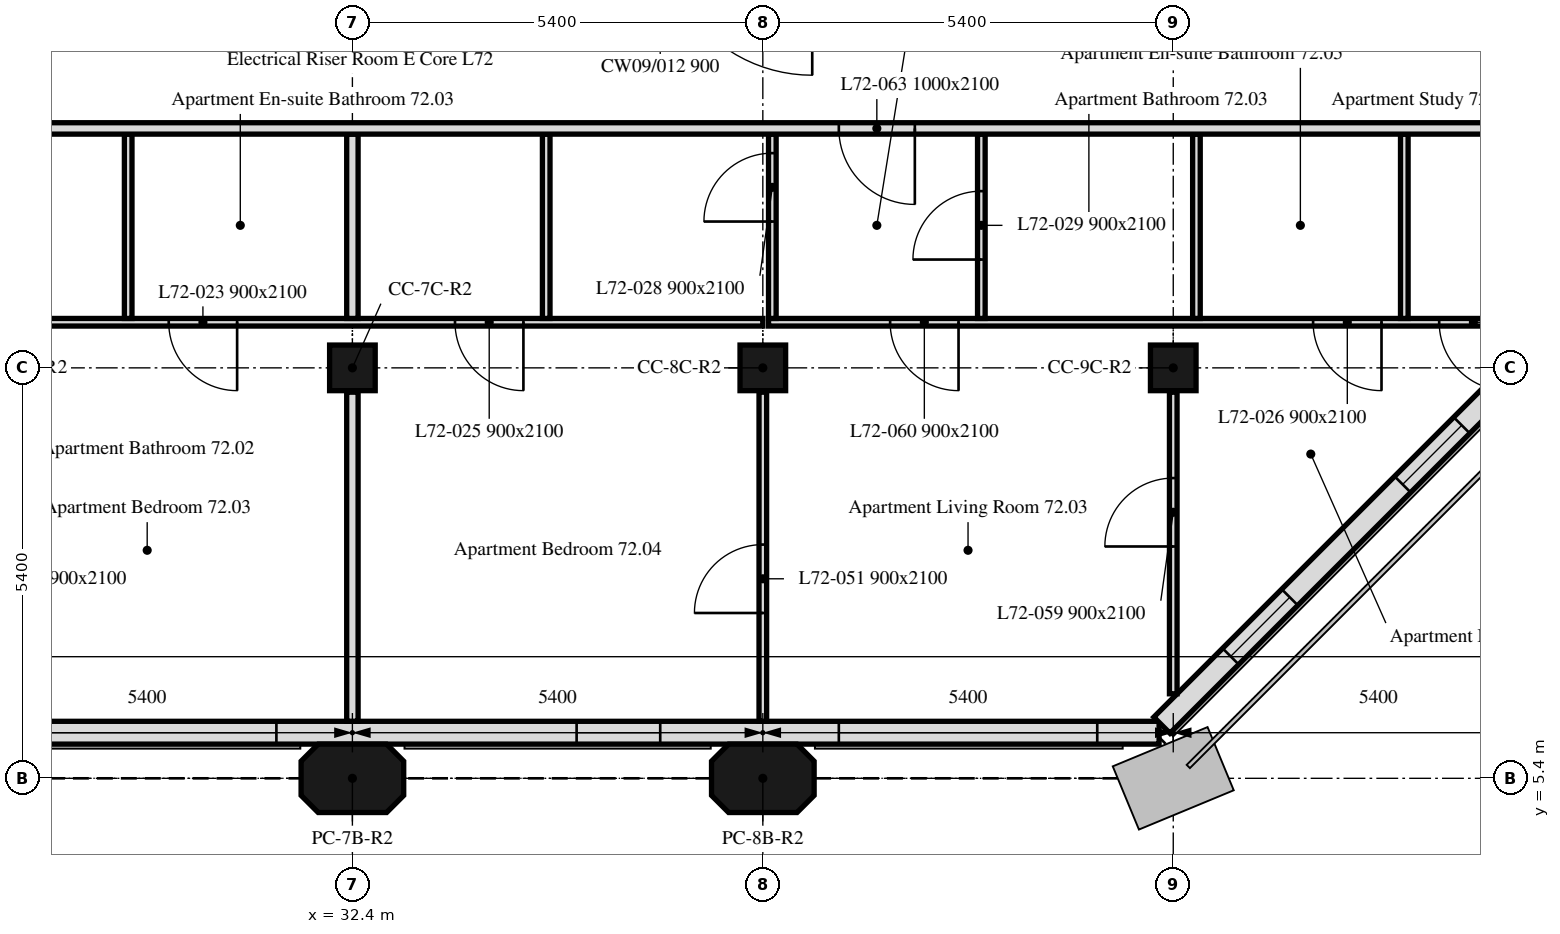
"""IFC4 building model, lengths in metres.
Left out: names, types, materials, properties, quantities, classifications, styles, units other than length and angle.
Written with IfcOpenShell. Run it as: python <this file> out.ifc"""

import sys

from ifc_helpers import new_model, si_unit, direction, frame, frame_2d, origin, origin_2d, place, context, subcontext, project, spatial, polyline, rectangle, outline, extrude, element, fill, save


model = new_model("IFC4")
c1 = context("Model", 3, precision=1e-05, world=origin(), true_north=direction((0.0, 1.0)))
c2 = subcontext(c1, "Body", "Model", "MODEL_VIEW")
j1 = project(units=[si_unit("LENGTHUNIT", "METRE"), si_unit("PLANEANGLEUNIT", "RADIAN")], contexts=[c1])
p1 = place(None, origin())
s1 = spatial("IfcSite", under=j1, at=p1, CompositionType="ELEMENT")
p2 = place(p1, origin())
s2 = spatial("IfcBuilding", under=s1, at=p2, CompositionType="ELEMENT")
p3 = place(p2, frame((0.0, 0.0, 291.7)))
s3 = spatial("IfcBuildingStorey", under=s2, at=p3, CompositionType="ELEMENT", Elevation=291.7)
for number, where, z_axis, x_axis in (
    (1, (32.4, 5.4, 0.0), (0.0, 0.0, 1.0), (1.0, 0.0, 0.0)),
    (2, (37.8, 5.4, 0.0), (0.0, 0.0, 1.0), (1.0, 0.0, 0.0)),
):
    element("IfcColumn", number, at=place(p3, frame(where, z_axis=z_axis, x_axis=x_axis)), inside=s3, PredefinedType="COLUMN", context=c2, shape_type="SweptSolid", body=[
        extrude(outline(polyline([(-0.45, -0.45), (0.45, -0.45), (0.675, -0.225), (0.675, 0.225), (0.45, 0.45), (-0.45, 0.45), (-0.675, 0.225), (-0.675, -0.225), (-0.45, -0.45)])), origin(), (0.0, 0.0, 1.0), 3.0),
    ])
for number, where, z_axis, x_axis in (
    (3, (32.4, 10.8, 0.0), (0.0, 0.0, 1.0), (1.0, 0.0, 0.0)),
    (4, (37.8, 10.8, 0.0), (0.0, 0.0, 1.0), (1.0, 0.0, 0.0)),
    (5, (43.2, 10.8, 0.0), (0.0, 0.0, 1.0), (1.0, 0.0, 0.0)),
):
    element("IfcColumn", number, at=place(p3, frame(where, z_axis=z_axis, x_axis=x_axis)), inside=s3, PredefinedType="COLUMN", context=c2, shape_type="SweptSolid", body=[
        extrude(rectangle(XDim=0.6, YDim=0.6, at=origin_2d()), origin(), (0.0, 0.0, 1.0), 3.0),
    ])
p4 = place(p3, frame((10.986, 6.0, 0.0), z_axis=(0.0, 0.0, 1.0), x_axis=(1.0, 0.0, 0.0)))
e6 = element("IfcWall", 6, at=p4, inside=s3, PredefinedType="SOLIDWALL", context=c2, shape_type="SweptSolid", body=[
    extrude(rectangle(XDim=32.027, YDim=0.3, at=frame_2d((16.014, 0.0))), origin(), (0.0, 0.0, 1.0), 3.0),
])
p5 = place(p4, frame((2.764, 0.0, 0.9)))
e7 = element("IfcOpeningElement", 7, at=p5, cuts=e6, PredefinedType="OPENING", context=c2, shape_type="SweptSolid", body=[
    extrude(rectangle(XDim=1.1, YDim=1.7, at=frame_2d((0.55, 0.85))), frame((0.0, 0.16, 0.0), z_axis=(0.0, -1.0, 0.0), x_axis=(1.0, 0.0, 0.0)), (0.0, 0.0, 1.0), 0.32),
])
p6 = place(p4, frame((6.214, 0.0, 0.9)))
e8 = element("IfcOpeningElement", 8, at=p6, cuts=e6, PredefinedType="OPENING", context=c2, shape_type="SweptSolid", body=[
    extrude(rectangle(XDim=3.4, YDim=1.7, at=frame_2d((1.7, 0.85))), frame((0.0, 0.16, 0.0), z_axis=(0.0, -1.0, 0.0), x_axis=(1.0, 0.0, 0.0)), (0.0, 0.0, 1.0), 0.32),
])
p7 = place(p4, frame((13.564, 0.0, 0.9)))
e9 = element("IfcOpeningElement", 9, at=p7, cuts=e6, PredefinedType="OPENING", context=c2, shape_type="SweptSolid", body=[
    extrude(rectangle(XDim=1.1, YDim=1.7, at=frame_2d((0.55, 0.85))), frame((0.0, 0.16, 0.0), z_axis=(0.0, -1.0, 0.0), x_axis=(1.0, 0.0, 0.0)), (0.0, 0.0, 1.0), 0.32),
])
p8 = place(p4, frame((17.014, 0.0, 0.9)))
e10 = element("IfcOpeningElement", 10, at=p8, cuts=e6, PredefinedType="OPENING", context=c2, shape_type="SweptSolid", body=[
    extrude(rectangle(XDim=3.4, YDim=1.7, at=frame_2d((1.7, 0.85))), frame((0.0, 0.16, 0.0), z_axis=(0.0, -1.0, 0.0), x_axis=(1.0, 0.0, 0.0)), (0.0, 0.0, 1.0), 0.32),
])
p9 = place(p4, frame((24.364, 0.0, 0.9)))
e11 = element("IfcOpeningElement", 11, at=p9, cuts=e6, PredefinedType="OPENING", context=c2, shape_type="SweptSolid", body=[
    extrude(rectangle(XDim=1.1, YDim=1.7, at=frame_2d((0.55, 0.85))), frame((0.0, 0.16, 0.0), z_axis=(0.0, -1.0, 0.0), x_axis=(1.0, 0.0, 0.0)), (0.0, 0.0, 1.0), 0.32),
])
p10 = place(p4, frame((27.814, 0.0, 0.9)))
e12 = element("IfcOpeningElement", 12, at=p10, cuts=e6, PredefinedType="OPENING", context=c2, shape_type="SweptSolid", body=[
    extrude(rectangle(XDim=3.4, YDim=1.7, at=frame_2d((1.7, 0.85))), frame((0.0, 0.16, 0.0), z_axis=(0.0, -1.0, 0.0), x_axis=(1.0, 0.0, 0.0)), (0.0, 0.0, 1.0), 0.32),
])
p11 = place(p3, frame((43.051, 6.099, 0.0), z_axis=(0.0, 0.0, 1.0), x_axis=(0.707106781187, 0.707106781187, 0.0)))
e13 = element("IfcWall", 13, at=p11, inside=s3, PredefinedType="SOLIDWALL", context=c2, shape_type="SweptSolid", body=[
    extrude(rectangle(XDim=6.86, YDim=0.3, at=frame_2d((3.43, 0.0))), origin(), (0.0, 0.0, 1.0), 3.0),
])
p12 = place(p11, frame((1.28, 0.0, 0.9)))
e14 = element("IfcOpeningElement", 14, at=p12, cuts=e13, PredefinedType="OPENING", context=c2, shape_type="SweptSolid", body=[
    extrude(rectangle(XDim=1.1, YDim=1.7, at=frame_2d((0.55, 0.85))), frame((0.0, 0.16, 0.0), z_axis=(0.0, -1.0, 0.0), x_axis=(1.0, 0.0, 0.0)), (0.0, 0.0, 1.0), 0.32),
])
p13 = place(p11, frame((4.48, 0.0, 0.9)))
e15 = element("IfcOpeningElement", 15, at=p13, cuts=e13, PredefinedType="OPENING", context=c2, shape_type="SweptSolid", body=[
    extrude(rectangle(XDim=1.1, YDim=1.7, at=frame_2d((0.55, 0.85))), frame((0.0, 0.16, 0.0), z_axis=(0.0, -1.0, 0.0), x_axis=(1.0, 0.0, 0.0)), (0.0, 0.0, 1.0), 0.32),
])
p14 = place(p3, frame((37.8, 11.4, 0.0), z_axis=(0.0, 0.0, 1.0), x_axis=(-1.0, 0.0, 0.0)))
e16 = element("IfcWall", 16, at=p14, inside=s3, PredefinedType="PARTITIONING", context=c2, shape_type="SweptSolid", body=[
    extrude(rectangle(XDim=21.6, YDim=0.1, at=frame_2d((10.8, 0.0))), origin(), (0.0, 0.0, 1.0), 3.0),
])
p15 = place(p14, frame((18.87, 0.0, 0.0)))
e17 = element("IfcOpeningElement", 17, at=p15, cuts=e16, PredefinedType="OPENING", context=c2, shape_type="SweptSolid", body=[
    extrude(rectangle(XDim=0.9, YDim=2.1, at=frame_2d((0.45, 1.05))), frame((0.0, 0.05, 0.0), z_axis=(0.0, -1.0, 0.0), x_axis=(1.0, 0.0, 0.0)), (0.0, 0.0, 1.0), 0.1),
])
p16 = place(p14, frame((17.5, 0.0, 0.0)))
e18 = element("IfcOpeningElement", 18, at=p16, cuts=e16, PredefinedType="OPENING", context=c2, shape_type="SweptSolid", body=[
    extrude(rectangle(XDim=0.9, YDim=2.1, at=frame_2d((0.45, 1.05))), frame((0.0, 0.05, 0.0), z_axis=(0.0, -1.0, 0.0), x_axis=(1.0, 0.0, 0.0)), (0.0, 0.0, 1.0), 0.1),
])
p17 = place(p14, frame((6.917, 0.0, 0.0)))
e19 = element("IfcOpeningElement", 19, at=p17, cuts=e16, PredefinedType="OPENING", context=c2, shape_type="SweptSolid", body=[
    extrude(rectangle(XDim=0.9, YDim=2.1, at=frame_2d((0.45, 1.05))), frame((0.0, 0.05, 0.0), z_axis=(0.0, -1.0, 0.0), x_axis=(1.0, 0.0, 0.0)), (0.0, 0.0, 1.0), 0.1),
])
p18 = place(p14, frame((3.15, 0.0, 0.0)))
e20 = element("IfcOpeningElement", 20, at=p18, cuts=e16, PredefinedType="OPENING", context=c2, shape_type="SweptSolid", body=[
    extrude(rectangle(XDim=0.9, YDim=2.1, at=frame_2d((0.45, 1.05))), frame((0.0, 0.05, 0.0), z_axis=(0.0, -1.0, 0.0), x_axis=(1.0, 0.0, 0.0)), (0.0, 0.0, 1.0), 0.1),
])
p19 = place(p14, frame((14.158, 0.0, 0.0)))
e21 = element("IfcOpeningElement", 21, at=p19, cuts=e16, PredefinedType="OPENING", context=c2, shape_type="SweptSolid", body=[
    extrude(rectangle(XDim=0.9, YDim=2.1, at=frame_2d((0.45, 1.05))), frame((0.0, 0.05, 0.0), z_axis=(0.0, -1.0, 0.0), x_axis=(1.0, 0.0, 0.0)), (0.0, 0.0, 1.0), 0.1),
])
p20 = place(p14, frame((12.788, 0.0, 0.0)))
e22 = element("IfcOpeningElement", 22, at=p20, cuts=e16, PredefinedType="OPENING", context=c2, shape_type="SweptSolid", body=[
    extrude(rectangle(XDim=0.9, YDim=2.1, at=frame_2d((0.45, 1.05))), frame((0.0, 0.05, 0.0), z_axis=(0.0, -1.0, 0.0), x_axis=(1.0, 0.0, 0.0)), (0.0, 0.0, 1.0), 0.1),
])
p21 = place(p3, frame((32.4, 6.151, 0.0), z_axis=(0.0, 0.0, 1.0), x_axis=(0.0, 1.0, 0.0)))
e23 = element("IfcWall", 23, at=p21, inside=s3, PredefinedType="PARTITIONING", context=c2, shape_type="SweptSolid", body=[
    extrude(rectangle(XDim=4.329, YDim=0.15, at=frame_2d((2.165, 0.0))), origin(), (0.0, 0.0, 1.0), 3.0),
])
p22 = place(p3, frame((29.45, 11.45, 0.0), z_axis=(0.0, 0.0, 1.0), x_axis=(0.0, 1.0, 0.0)))
e24 = element("IfcWall", 24, at=p22, inside=s3, PredefinedType="PARTITIONING", context=c2, shape_type="SweptSolid", body=[
    extrude(rectangle(XDim=2.425, YDim=0.1, at=frame_2d((1.212, 0.0))), origin(), (0.0, 0.0, 1.0), 3.0),
])
p23 = place(p3, frame((32.4, 11.45, 0.0), z_axis=(0.0, 0.0, 1.0), x_axis=(0.0, 1.0, 0.0)))
e25 = element("IfcWall", 25, at=p23, inside=s3, PredefinedType="PARTITIONING", context=c2, shape_type="SweptSolid", body=[
    extrude(rectangle(XDim=2.425, YDim=0.15, at=frame_2d((1.212, 0.0))), origin(), (0.0, 0.0, 1.0), 3.0),
])
p24 = place(p3, frame((37.8, 6.151, 0.0), z_axis=(0.0, 0.0, 1.0), x_axis=(0.0, 1.0, 0.0)))
e26 = element("IfcWall", 26, at=p24, inside=s3, PredefinedType="PARTITIONING", context=c2, shape_type="SweptSolid", body=[
    extrude(rectangle(XDim=4.329, YDim=0.1, at=frame_2d((2.165, 0.0))), origin(), (0.0, 0.0, 1.0), 3.0),
])
p25 = place(p24, frame((1.424, 0.0, 0.0)))
e27 = element("IfcOpeningElement", 27, at=p25, cuts=e26, PredefinedType="OPENING", context=c2, shape_type="SweptSolid", body=[
    extrude(rectangle(XDim=0.9, YDim=2.1, at=frame_2d((0.45, 1.05))), frame((0.0, 0.05, 0.0), z_axis=(0.0, -1.0, 0.0), x_axis=(1.0, 0.0, 0.0)), (0.0, 0.0, 1.0), 0.1),
])
p26 = place(p3, frame((43.2, 6.512, 0.0), z_axis=(0.0, 0.0, 1.0), x_axis=(0.0, 1.0, 0.0)))
e28 = element("IfcWall", 28, at=p26, inside=s3, PredefinedType="PARTITIONING", context=c2, shape_type="SweptSolid", body=[
    extrude(rectangle(XDim=3.968, YDim=0.1, at=frame_2d((1.984, 0.0))), origin(), (0.0, 0.0, 1.0), 3.0),
])
p27 = place(p26, frame((1.938, 0.0, 0.0)))
e29 = element("IfcOpeningElement", 29, at=p27, cuts=e28, PredefinedType="OPENING", context=c2, shape_type="SweptSolid", body=[
    extrude(rectangle(XDim=0.9, YDim=2.1, at=frame_2d((0.45, 1.05))), frame((0.0, 0.05, 0.0), z_axis=(0.0, -1.0, 0.0), x_axis=(1.0, 0.0, 0.0)), (0.0, 0.0, 1.0), 0.1),
])
p28 = place(p3, frame((47.849, 11.4, 0.0), z_axis=(0.0, 0.0, 1.0), x_axis=(-1.0, 0.0, 0.0)))
e30 = element("IfcWall", 30, at=p28, inside=s3, PredefinedType="PARTITIONING", context=c2, shape_type="SweptSolid", body=[
    extrude(rectangle(XDim=9.974, YDim=0.1, at=frame_2d((4.987, 0.0))), origin(), (0.0, 0.0, 1.0), 3.0),
])
p29 = place(p28, frame((1.909, 0.0, 0.0)))
e31 = element("IfcOpeningElement", 31, at=p29, cuts=e30, PredefinedType="OPENING", context=c2, shape_type="SweptSolid", body=[
    extrude(rectangle(XDim=0.9, YDim=2.1, at=frame_2d((0.45, 1.05))), frame((0.0, 0.05, 0.0), z_axis=(0.0, -1.0, 0.0), x_axis=(1.0, 0.0, 0.0)), (0.0, 0.0, 1.0), 0.1),
])
p30 = place(p28, frame((0.25, 0.0, 0.0)))
e32 = element("IfcOpeningElement", 32, at=p30, cuts=e30, PredefinedType="OPENING", context=c2, shape_type="SweptSolid", body=[
    extrude(rectangle(XDim=0.9, YDim=2.1, at=frame_2d((0.45, 1.05))), frame((0.0, 0.05, 0.0), z_axis=(0.0, -1.0, 0.0), x_axis=(1.0, 0.0, 0.0)), (0.0, 0.0, 1.0), 0.1),
])
p31 = place(p28, frame((7.474, 0.0, 0.0)))
e33 = element("IfcOpeningElement", 33, at=p31, cuts=e30, PredefinedType="OPENING", context=c2, shape_type="SweptSolid", body=[
    extrude(rectangle(XDim=0.9, YDim=2.1, at=frame_2d((0.45, 1.05))), frame((0.0, 0.05, 0.0), z_axis=(0.0, -1.0, 0.0), x_axis=(1.0, 0.0, 0.0)), (0.0, 0.0, 1.0), 0.1),
])
p32 = place(p3, frame((34.95, 11.45, 0.0), z_axis=(0.0, 0.0, 1.0), x_axis=(0.0, 1.0, 0.0)))
e34 = element("IfcWall", 34, at=p32, inside=s3, PredefinedType="PARTITIONING", context=c2, shape_type="SweptSolid", body=[
    extrude(rectangle(XDim=2.425, YDim=0.1, at=frame_2d((1.212, 0.0))), origin(), (0.0, 0.0, 1.0), 3.0),
])
p33 = place(p3, frame((37.925, 11.45, 0.0), z_axis=(0.0, 0.0, 1.0), x_axis=(0.0, 1.0, 0.0)))
e35 = element("IfcWall", 35, at=p33, inside=s3, PredefinedType="PARTITIONING", context=c2, shape_type="SweptSolid", body=[
    extrude(rectangle(XDim=2.425, YDim=0.1, at=frame_2d((1.212, 0.0))), origin(), (0.0, 0.0, 1.0), 3.0),
])
p34 = place(p33, frame((1.275, 0.0, 0.0)))
e36 = element("IfcOpeningElement", 36, at=p34, cuts=e35, PredefinedType="OPENING", context=c2, shape_type="SweptSolid", body=[
    extrude(rectangle(XDim=0.9, YDim=2.1, at=frame_2d((0.45, 1.05))), frame((0.0, 0.05, 0.0), z_axis=(0.0, -1.0, 0.0), x_axis=(1.0, 0.0, 0.0)), (0.0, 0.0, 1.0), 0.1),
])
p35 = place(p3, frame((40.675, 11.45, 0.0), z_axis=(0.0, 0.0, 1.0), x_axis=(0.0, 1.0, 0.0)))
e37 = element("IfcWall", 37, at=p35, inside=s3, PredefinedType="PARTITIONING", context=c2, shape_type="SweptSolid", body=[
    extrude(rectangle(XDim=2.425, YDim=0.1, at=frame_2d((1.212, 0.0))), origin(), (0.0, 0.0, 1.0), 3.0),
])
p36 = place(p35, frame((0.775, 0.0, 0.0)))
e38 = element("IfcOpeningElement", 38, at=p36, cuts=e37, PredefinedType="OPENING", context=c2, shape_type="SweptSolid", body=[
    extrude(rectangle(XDim=0.9, YDim=2.1, at=frame_2d((0.45, 1.05))), frame((0.0, 0.05, 0.0), z_axis=(0.0, -1.0, 0.0), x_axis=(1.0, 0.0, 0.0)), (0.0, 0.0, 1.0), 0.1),
])
for number, where, z_axis, x_axis in (
    (39, (43.505, 11.45, 0.0), (0.0, 0.0, 1.0), (0.0, 1.0, 0.0)),
    (40, (46.24, 11.45, 0.0), (0.0, 0.0, 1.0), (0.0, 1.0, 0.0)),
):
    element("IfcWall", number, at=place(p3, frame(where, z_axis=z_axis, x_axis=x_axis)), inside=s3, PredefinedType="PARTITIONING", context=c2, shape_type="SweptSolid", body=[
        extrude(rectangle(XDim=2.425, YDim=0.1, at=frame_2d((1.212, 0.0))), origin(), (0.0, 0.0, 1.0), 3.0),
    ])
p37 = place(p3, frame((47.849, 13.95, 0.0), z_axis=(0.0, 0.0, 1.0), x_axis=(-1.0, 0.0, 0.0)))
e41 = element("IfcWall", 41, at=p37, inside=s3, PredefinedType="PARTITIONING", context=c2, shape_type="SweptSolid", body=[
    extrude(rectangle(XDim=41.698, YDim=0.15, at=frame_2d((20.849, 0.0))), origin(), (0.0, 0.0, 1.0), 3.0),
])
p38 = place(p37, frame((35.609, 0.0, 0.0)))
e42 = element("IfcOpeningElement", 42, at=p38, cuts=e41, PredefinedType="OPENING", context=c2, shape_type="SweptSolid", body=[
    extrude(rectangle(XDim=1.0, YDim=2.1, at=frame_2d((0.5, 1.05))), frame((0.0, 0.075, 0.0), z_axis=(0.0, -1.0, 0.0), x_axis=(1.0, 0.0, 0.0)), (0.0, 0.0, 1.0), 0.15),
])
p39 = place(p37, frame((22.354, 0.0, 0.0)))
e43 = element("IfcOpeningElement", 43, at=p39, cuts=e41, PredefinedType="OPENING", context=c2, shape_type="SweptSolid", body=[
    extrude(rectangle(XDim=1.0, YDim=2.1, at=frame_2d((0.5, 1.05))), frame((0.0, 0.075, 0.0), z_axis=(0.0, -1.0, 0.0), x_axis=(1.0, 0.0, 0.0)), (0.0, 0.0, 1.0), 0.15),
])
p40 = place(p37, frame((8.049, 0.0, 0.0)))
e44 = element("IfcOpeningElement", 44, at=p40, cuts=e41, PredefinedType="OPENING", context=c2, shape_type="SweptSolid", body=[
    extrude(rectangle(XDim=1.0, YDim=2.1, at=frame_2d((0.5, 1.05))), frame((0.0, 0.075, 0.0), z_axis=(0.0, -1.0, 0.0), x_axis=(1.0, 0.0, 0.0)), (0.0, 0.0, 1.0), 0.15),
])
p41 = place(p8, origin())
e45 = element("IfcWindow", 45, at=p41, inside=s3, PartitioningType="SINGLE_PANEL", PredefinedType="WINDOW", context=c2, shape_type="SweptSolid", body=[
    extrude(rectangle(XDim=3.4, YDim=1.7, at=frame_2d((1.7, 0.85))), frame((0.0, 0.03, 0.0), z_axis=(0.0, -1.0, 0.0), x_axis=(1.0, 0.0, 0.0)), (0.0, 0.0, 1.0), 0.06),
])
fill(e10, e45)
p42 = place(p9, origin())
e46 = element("IfcWindow", 46, at=p42, inside=s3, PartitioningType="SINGLE_PANEL", PredefinedType="WINDOW", context=c2, shape_type="SweptSolid", body=[
    extrude(rectangle(XDim=1.1, YDim=1.7, at=frame_2d((0.55, 0.85))), frame((0.0, 0.03, 0.0), z_axis=(0.0, -1.0, 0.0), x_axis=(1.0, 0.0, 0.0)), (0.0, 0.0, 1.0), 0.06),
])
fill(e11, e46)
p43 = place(p10, origin())
e47 = element("IfcWindow", 47, at=p43, inside=s3, PartitioningType="SINGLE_PANEL", PredefinedType="WINDOW", context=c2, shape_type="SweptSolid", body=[
    extrude(rectangle(XDim=3.4, YDim=1.7, at=frame_2d((1.7, 0.85))), frame((0.0, 0.03, 0.0), z_axis=(0.0, -1.0, 0.0), x_axis=(1.0, 0.0, 0.0)), (0.0, 0.0, 1.0), 0.06),
])
fill(e12, e47)
p44 = place(p12, origin())
e48 = element("IfcWindow", 48, at=p44, inside=s3, PartitioningType="SINGLE_PANEL", PredefinedType="WINDOW", context=c2, shape_type="SweptSolid", body=[
    extrude(rectangle(XDim=1.1, YDim=1.7, at=frame_2d((0.55, 0.85))), frame((0.0, 0.03, 0.0), z_axis=(0.0, -1.0, 0.0), x_axis=(1.0, 0.0, 0.0)), (0.0, 0.0, 1.0), 0.06),
])
fill(e14, e48)
p45 = place(p13, origin())
e49 = element("IfcWindow", 49, at=p45, inside=s3, PartitioningType="SINGLE_PANEL", PredefinedType="WINDOW", context=c2, shape_type="SweptSolid", body=[
    extrude(rectangle(XDim=1.1, YDim=1.7, at=frame_2d((0.55, 0.85))), frame((0.0, 0.03, 0.0), z_axis=(0.0, -1.0, 0.0), x_axis=(1.0, 0.0, 0.0)), (0.0, 0.0, 1.0), 0.06),
])
fill(e15, e49)
p46 = place(p17, origin())
e50 = element("IfcDoor", 50, at=p46, inside=s3, OperationType="SINGLE_SWING_RIGHT", PredefinedType="DOOR", context=c2, shape_type="SweptSolid", body=[
    extrude(rectangle(XDim=0.9, YDim=2.1, at=frame_2d((0.45, 1.05))), frame((0.0, 0.025, 0.0), z_axis=(0.0, -1.0, 0.0), x_axis=(1.0, 0.0, 0.0)), (0.0, 0.0, 1.0), 0.05),
])
fill(e19, e50)
p47 = place(p18, origin())
e51 = element("IfcDoor", 51, at=p47, inside=s3, OperationType="SINGLE_SWING_LEFT", PredefinedType="DOOR", context=c2, shape_type="SweptSolid", body=[
    extrude(rectangle(XDim=0.9, YDim=2.1, at=frame_2d((0.45, 1.05))), frame((0.0, 0.025, 0.0), z_axis=(0.0, -1.0, 0.0), x_axis=(1.0, 0.0, 0.0)), (0.0, 0.0, 1.0), 0.05),
])
fill(e20, e51)
p48 = place(p29, origin())
e52 = element("IfcDoor", 52, at=p48, inside=s3, OperationType="SINGLE_SWING_RIGHT", PredefinedType="DOOR", context=c2, shape_type="SweptSolid", body=[
    extrude(rectangle(XDim=0.9, YDim=2.1, at=frame_2d((0.45, 1.05))), frame((0.0, 0.025, 0.0), z_axis=(0.0, -1.0, 0.0), x_axis=(1.0, 0.0, 0.0)), (0.0, 0.0, 1.0), 0.05),
])
fill(e31, e52)
p49 = place(p30, origin())
e53 = element("IfcDoor", 53, at=p49, inside=s3, OperationType="SINGLE_SWING_LEFT", PredefinedType="DOOR", context=c2, shape_type="SweptSolid", body=[
    extrude(rectangle(XDim=0.9, YDim=2.1, at=frame_2d((0.45, 1.05))), frame((0.0, 0.025, 0.0), z_axis=(0.0, -1.0, 0.0), x_axis=(1.0, 0.0, 0.0)), (0.0, 0.0, 1.0), 0.05),
])
fill(e32, e53)
p50 = place(p34, origin())
e54 = element("IfcDoor", 54, at=p50, inside=s3, OperationType="SINGLE_SWING_RIGHT", PredefinedType="DOOR", context=c2, shape_type="SweptSolid", body=[
    extrude(rectangle(XDim=0.9, YDim=2.1, at=frame_2d((0.45, 1.05))), frame((0.0, 0.025, 0.0), z_axis=(0.0, -1.0, 0.0), x_axis=(1.0, 0.0, 0.0)), (0.0, 0.0, 1.0), 0.05),
])
fill(e36, e54)
p51 = place(p36, origin())
e55 = element("IfcDoor", 55, at=p51, inside=s3, OperationType="SINGLE_SWING_LEFT", PredefinedType="DOOR", context=c2, shape_type="SweptSolid", body=[
    extrude(rectangle(XDim=0.9, YDim=2.1, at=frame_2d((0.45, 1.05))), frame((0.0, 0.025, 0.0), z_axis=(0.0, -1.0, 0.0), x_axis=(1.0, 0.0, 0.0)), (0.0, 0.0, 1.0), 0.05),
])
fill(e38, e55)
p52 = place(p25, origin())
e56 = element("IfcDoor", 56, at=p52, inside=s3, OperationType="SINGLE_SWING_RIGHT", PredefinedType="DOOR", context=c2, shape_type="SweptSolid", body=[
    extrude(rectangle(XDim=0.9, YDim=2.1, at=frame_2d((0.45, 1.05))), frame((0.0, 0.025, 0.0), z_axis=(0.0, -1.0, 0.0), x_axis=(1.0, 0.0, 0.0)), (0.0, 0.0, 1.0), 0.05),
])
fill(e27, e56)
p53 = place(p27, origin())
e57 = element("IfcDoor", 57, at=p53, inside=s3, OperationType="SINGLE_SWING_LEFT", PredefinedType="DOOR", context=c2, shape_type="SweptSolid", body=[
    extrude(rectangle(XDim=0.9, YDim=2.1, at=frame_2d((0.45, 1.05))), frame((0.0, 0.025, 0.0), z_axis=(0.0, -1.0, 0.0), x_axis=(1.0, 0.0, 0.0)), (0.0, 0.0, 1.0), 0.05),
])
fill(e29, e57)
p54 = place(p31, origin())
e58 = element("IfcDoor", 58, at=p54, inside=s3, OperationType="SINGLE_SWING_LEFT", PredefinedType="DOOR", context=c2, shape_type="SweptSolid", body=[
    extrude(rectangle(XDim=0.9, YDim=2.1, at=frame_2d((0.45, 1.05))), frame((0.0, 0.025, 0.0), z_axis=(0.0, -1.0, 0.0), x_axis=(1.0, 0.0, 0.0)), (0.0, 0.0, 1.0), 0.05),
])
fill(e33, e58)
p55 = place(p40, origin())
e59 = element("IfcDoor", 59, at=p55, inside=s3, OperationType="SINGLE_SWING_LEFT", PredefinedType="DOOR", context=c2, shape_type="SweptSolid", body=[
    extrude(rectangle(XDim=1.0, YDim=2.1, at=frame_2d((0.5, 1.05))), frame((0.0, 0.025, 0.0), z_axis=(0.0, -1.0, 0.0), x_axis=(1.0, 0.0, 0.0)), (0.0, 0.0, 1.0), 0.05),
])
fill(e44, e59)
save(model, sys.argv[1])
